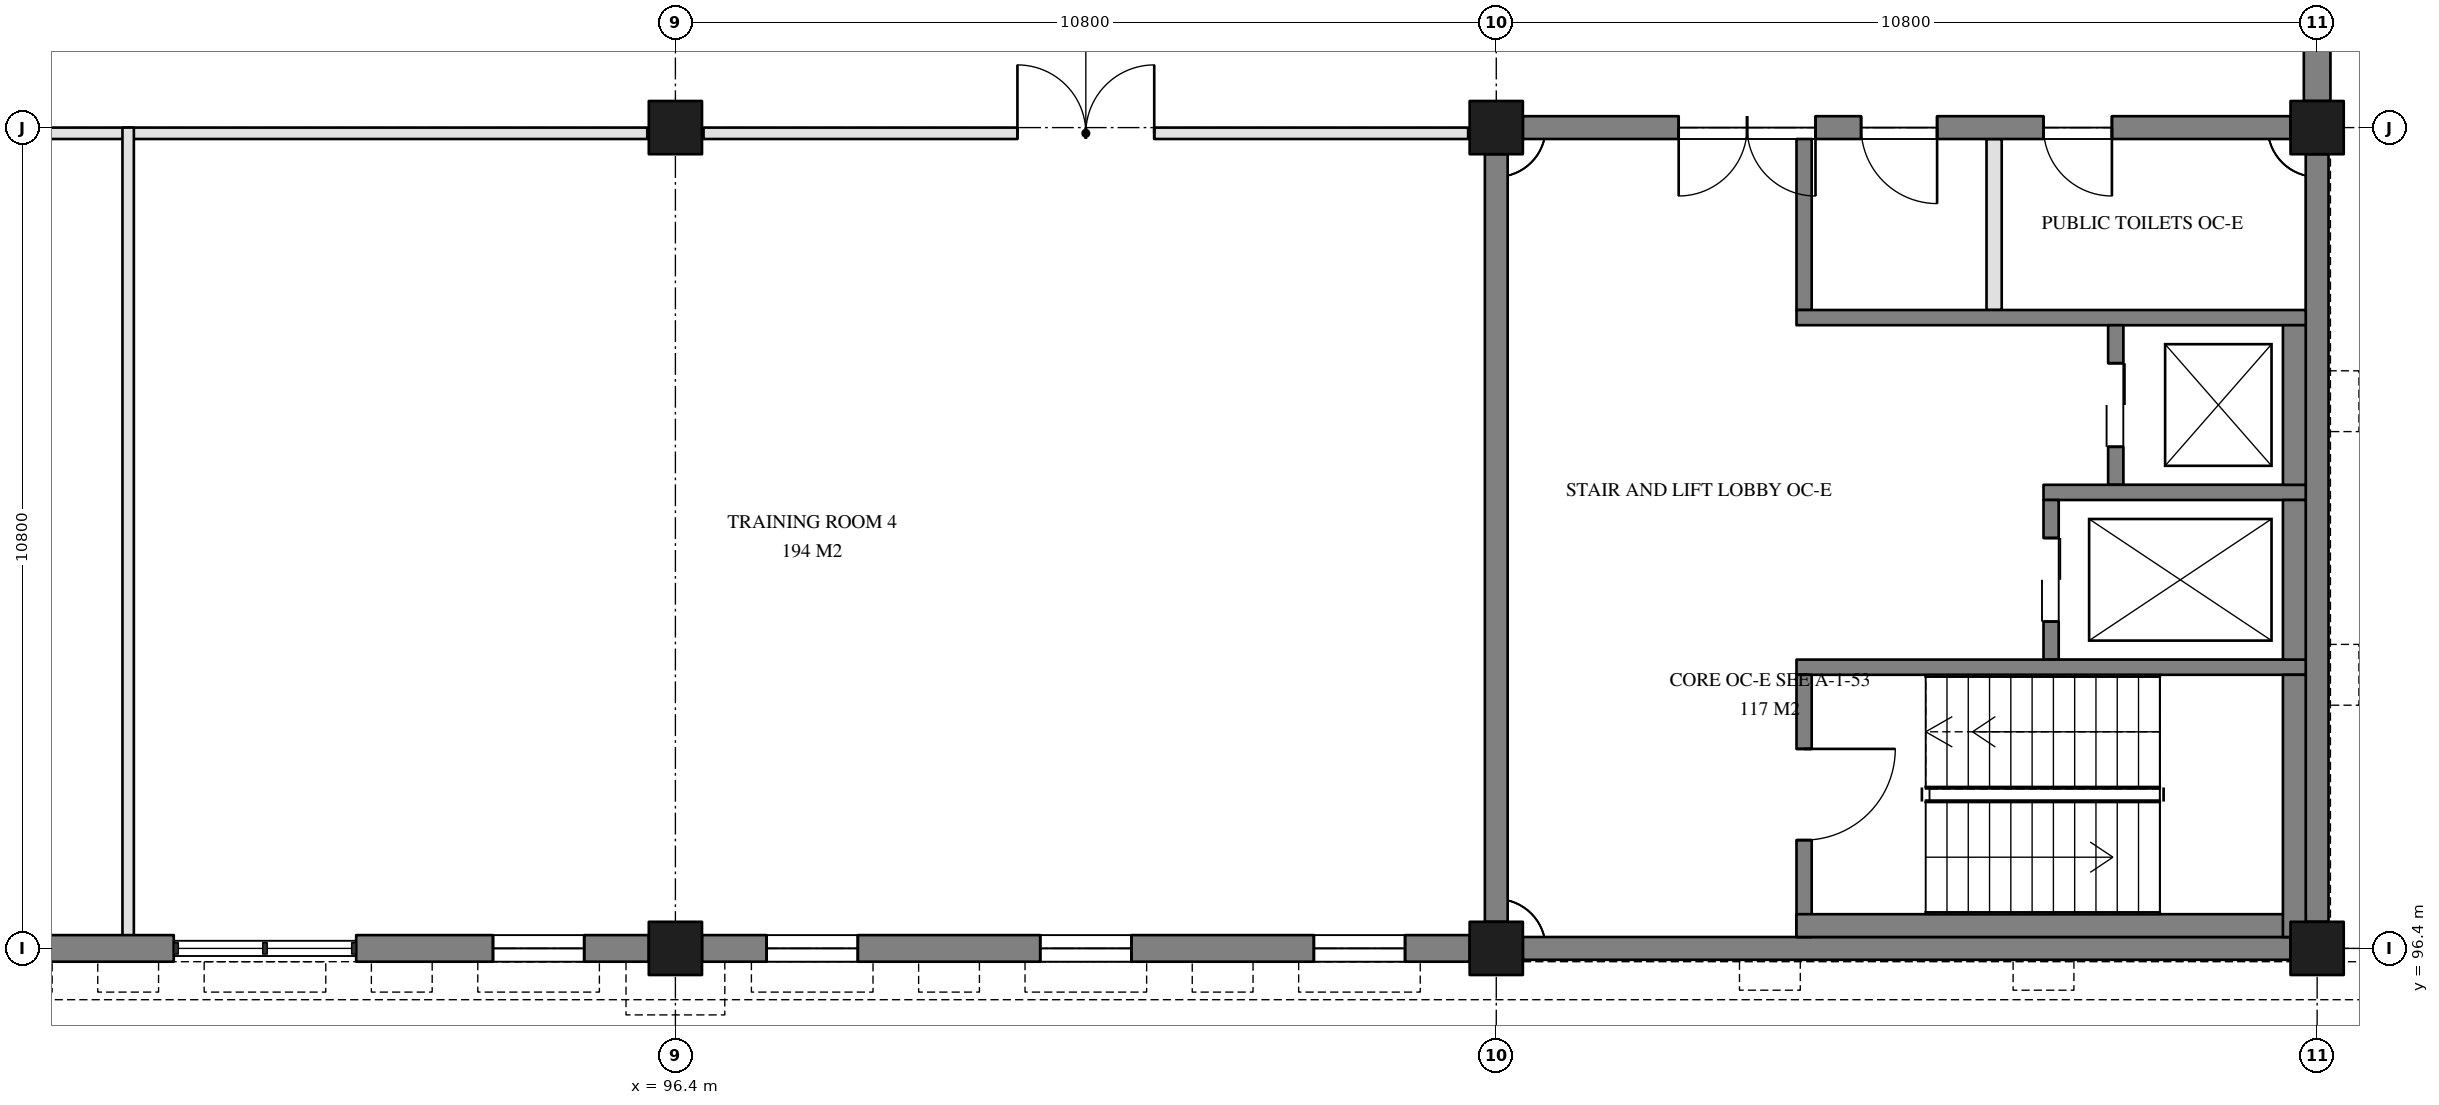
"""IFC4 building model, lengths in metres.
Left out: names, types, materials, properties, quantities, classifications, styles, units other than length and angle.
Written with IfcOpenShell. Run it as: python <this file> out.ifc"""

import sys

from ifc_helpers import new_model, si_unit, direction, frame, frame_2d, origin, origin_2d, place, context, subcontext, project, spatial, rectangle, extrude, element, fill, save


model = new_model("IFC4")
c1 = context("Model", 3, precision=1e-05, world=origin(), true_north=direction((0.0, 1.0)))
c2 = subcontext(c1, "Body", "Model", "MODEL_VIEW")
j1 = project(units=[si_unit("LENGTHUNIT", "METRE"), si_unit("PLANEANGLEUNIT", "RADIAN")], contexts=[c1])
p1 = place(None, origin())
s1 = spatial("IfcSite", under=j1, at=p1, CompositionType="ELEMENT")
p2 = place(p1, origin())
s2 = spatial("IfcBuilding", under=s1, at=p2, CompositionType="ELEMENT")
p3 = place(p2, frame((0.0, 0.0, 20.4)))
s3 = spatial("IfcBuildingStorey", under=s2, at=p3, CompositionType="ELEMENT", Elevation=20.4)
for number, where, z_axis, x_axis in (
    (1, (96.4, 96.4, 0.0), (0.0, 0.0, 1.0), (1.0, 0.0, 0.0)),
    (2, (96.4, 107.2, 0.0), (0.0, 0.0, 1.0), (1.0, 0.0, 0.0)),
    (3, (107.2, 96.4, 0.0), (0.0, 0.0, 1.0), (1.0, 0.0, 0.0)),
    (4, (107.2, 107.2, 0.0), (0.0, 0.0, 1.0), (1.0, 0.0, 0.0)),
    (5, (118.0, 96.4, 0.0), (0.0, 0.0, 1.0), (1.0, 0.0, 0.0)),
    (6, (118.0, 107.2, 0.0), (0.0, 0.0, 1.0), (1.0, 0.0, 0.0)),
):
    element("IfcColumn", number, at=place(p3, frame(where, z_axis=z_axis, x_axis=x_axis)), inside=s3, PredefinedType="COLUMN", context=c2, shape_type="SweptSolid", body=[
        extrude(rectangle(XDim=0.7, YDim=0.7, at=origin_2d()), origin(), (0.0, 0.0, 1.0), 3.9),
    ])
p4 = place(p3, frame((107.55, 96.4, 0.0), z_axis=(0.0, 0.0, 1.0), x_axis=(1.0, 0.0, 0.0)))
e7 = element("IfcWall", 7, at=p4, inside=s3, PredefinedType="SOLIDWALL", context=c2, shape_type="SweptSolid", body=[
    extrude(rectangle(XDim=10.1, YDim=0.3, at=frame_2d((5.05, 0.0))), origin(), (0.0, 0.0, 1.0), 3.9),
])
p5 = place(p3, frame((118.0, 96.75, 0.0), z_axis=(0.0, 0.0, 1.0), x_axis=(0.0, 1.0, 0.0)))
e8 = element("IfcWall", 8, at=p5, inside=s3, PredefinedType="SOLIDWALL", context=c2, shape_type="SweptSolid", body=[
    extrude(rectangle(XDim=10.1, YDim=0.3, at=frame_2d((5.05, 0.0))), origin(), (0.0, 0.0, 1.0), 3.9),
])
p6 = place(p3, frame((117.65, 107.2, 0.0), z_axis=(0.0, 0.0, 1.0), x_axis=(-1.0, 0.0, 0.0)))
e9 = element("IfcWall", 9, at=p6, inside=s3, PredefinedType="SOLIDWALL", context=c2, shape_type="SweptSolid", body=[
    extrude(rectangle(XDim=10.1, YDim=0.3, at=frame_2d((5.05, 0.0))), origin(), (0.0, 0.0, 1.0), 3.9),
])
p7 = place(p6, frame((6.25, 0.0, 0.0)))
e10 = element("IfcOpeningElement", 10, at=p7, cuts=e9, PredefinedType="OPENING", context=c2, shape_type="SweptSolid", body=[
    extrude(rectangle(XDim=1.8, YDim=2.1, at=frame_2d((0.9, 1.05))), frame((0.0, 0.16, 0.0), z_axis=(0.0, -1.0, 0.0), x_axis=(1.0, 0.0, 0.0)), (0.0, 0.0, 1.0), 0.32),
])
p8 = place(p6, frame((4.65, 0.0, 0.0)))
e11 = element("IfcOpeningElement", 11, at=p8, cuts=e9, PredefinedType="OPENING", context=c2, shape_type="SweptSolid", body=[
    extrude(rectangle(XDim=1.0, YDim=2.1, at=frame_2d((0.5, 1.05))), frame((0.0, 0.16, 0.0), z_axis=(0.0, -1.0, 0.0), x_axis=(1.0, 0.0, 0.0)), (0.0, 0.0, 1.0), 0.32),
])
p9 = place(p6, frame((2.35, 0.0, 0.0)))
e12 = element("IfcOpeningElement", 12, at=p9, cuts=e9, PredefinedType="OPENING", context=c2, shape_type="SweptSolid", body=[
    extrude(rectangle(XDim=0.9, YDim=2.1, at=frame_2d((0.45, 1.05))), frame((0.0, 0.16, 0.0), z_axis=(0.0, -1.0, 0.0), x_axis=(1.0, 0.0, 0.0)), (0.0, 0.0, 1.0), 0.32),
])
p10 = place(p3, frame((107.2, 106.85, 0.0), z_axis=(0.0, 0.0, 1.0), x_axis=(0.0, -1.0, 0.0)))
e13 = element("IfcWall", 13, at=p10, inside=s3, PredefinedType="SOLIDWALL", context=c2, shape_type="SweptSolid", body=[
    extrude(rectangle(XDim=10.1, YDim=0.3, at=frame_2d((5.05, 0.0))), origin(), (0.0, 0.0, 1.0), 3.9),
])
p11 = place(p3, frame((85.95, 96.4, 0.0), z_axis=(0.0, 0.0, 1.0), x_axis=(1.0, 0.0, 0.0)))
e14 = element("IfcWall", 14, at=p11, inside=s3, PredefinedType="SOLIDWALL", context=c2, shape_type="SweptSolid", body=[
    extrude(rectangle(XDim=3.85, YDim=0.35, at=frame_2d((1.925, 0.0))), origin(), (0.0, 0.0, 1.0), 2.8),
])
p12 = place(p11, frame((0.85, 0.0, 0.9)))
e15 = element("IfcOpeningElement", 15, at=p12, cuts=e14, PredefinedType="OPENING", context=c2, shape_type="SweptSolid", body=[
    extrude(rectangle(XDim=1.2, YDim=1.8, at=frame_2d((0.6, 0.9))), frame((0.0, 0.185, 0.0), z_axis=(0.0, -1.0, 0.0), x_axis=(1.0, 0.0, 0.0)), (0.0, 0.0, 1.0), 0.37),
])
p13 = place(p3, frame((92.2, 96.4, 0.0), z_axis=(0.0, 0.0, 1.0), x_axis=(1.0, 0.0, 0.0)))
e16 = element("IfcWall", 16, at=p13, inside=s3, PredefinedType="SOLIDWALL", context=c2, shape_type="SweptSolid", body=[
    extrude(rectangle(XDim=3.85, YDim=0.35, at=frame_2d((1.925, 0.0))), origin(), (0.0, 0.0, 1.0), 2.8),
])
p14 = place(p13, frame((1.8, 0.0, 0.9)))
e17 = element("IfcOpeningElement", 17, at=p14, cuts=e16, PredefinedType="OPENING", context=c2, shape_type="SweptSolid", body=[
    extrude(rectangle(XDim=1.2, YDim=1.8, at=frame_2d((0.6, 0.9))), frame((0.0, 0.185, 0.0), z_axis=(0.0, -1.0, 0.0), x_axis=(1.0, 0.0, 0.0)), (0.0, 0.0, 1.0), 0.37),
])
p15 = place(p3, frame((96.75, 96.4, 0.0), z_axis=(0.0, 0.0, 1.0), x_axis=(1.0, 0.0, 0.0)))
e18 = element("IfcWall", 18, at=p15, inside=s3, PredefinedType="SOLIDWALL", context=c2, shape_type="SweptSolid", body=[
    extrude(rectangle(XDim=10.1, YDim=0.35, at=frame_2d((5.05, 0.0))), origin(), (0.0, 0.0, 1.0), 2.8),
])
p16 = place(p15, frame((0.85, 0.0, 0.9)))
e19 = element("IfcOpeningElement", 19, at=p16, cuts=e18, PredefinedType="OPENING", context=c2, shape_type="SweptSolid", body=[
    extrude(rectangle(XDim=1.2, YDim=1.8, at=frame_2d((0.6, 0.9))), frame((0.0, 0.185, 0.0), z_axis=(0.0, -1.0, 0.0), x_axis=(1.0, 0.0, 0.0)), (0.0, 0.0, 1.0), 0.37),
])
p17 = place(p15, frame((4.45, 0.0, 0.9)))
e20 = element("IfcOpeningElement", 20, at=p17, cuts=e18, PredefinedType="OPENING", context=c2, shape_type="SweptSolid", body=[
    extrude(rectangle(XDim=1.2, YDim=1.8, at=frame_2d((0.6, 0.9))), frame((0.0, 0.185, 0.0), z_axis=(0.0, -1.0, 0.0), x_axis=(1.0, 0.0, 0.0)), (0.0, 0.0, 1.0), 0.37),
])
p18 = place(p15, frame((8.05, 0.0, 0.9)))
e21 = element("IfcOpeningElement", 21, at=p18, cuts=e18, PredefinedType="OPENING", context=c2, shape_type="SweptSolid", body=[
    extrude(rectangle(XDim=1.2, YDim=1.8, at=frame_2d((0.6, 0.9))), frame((0.0, 0.185, 0.0), z_axis=(0.0, -1.0, 0.0), x_axis=(1.0, 0.0, 0.0)), (0.0, 0.0, 1.0), 0.37),
])
p19 = place(p3, frame((118.0, 107.55, 0.0), z_axis=(0.0, 0.0, 1.0), x_axis=(0.0, 1.0, 0.0)))
e22 = element("IfcWall", 22, at=p19, inside=s3, PredefinedType="SOLIDWALL", context=c2, shape_type="SweptSolid", body=[
    extrude(rectangle(XDim=3.85, YDim=0.35, at=frame_2d((1.925, 0.0))), origin(), (0.0, 0.0, 1.0), 2.8),
])
p20 = place(p19, frame((1.0, 0.0, 0.9)))
e23 = element("IfcOpeningElement", 23, at=p20, cuts=e22, PredefinedType="OPENING", context=c2, shape_type="SweptSolid", body=[
    extrude(rectangle(XDim=0.9, YDim=1.8, at=frame_2d((0.45, 0.9))), frame((0.0, 0.185, 0.0), z_axis=(0.0, -1.0, 0.0), x_axis=(1.0, 0.0, 0.0)), (0.0, 0.0, 1.0), 0.37),
])
p21 = place(p3, frame((111.25, 107.05, 0.0), z_axis=(0.0, 0.0, 1.0), x_axis=(0.0, -1.0, 0.0)))
e24 = element("IfcWall", 24, at=p21, inside=s3, PredefinedType="SOLIDWALL", context=c2, shape_type="SweptSolid", body=[
    extrude(rectangle(XDim=2.25, YDim=0.2, at=frame_2d((1.125, 0.0))), origin(), (0.0, 0.0, 1.0), 3.6),
])
p22 = place(p3, frame((111.15, 104.7, 0.0), z_axis=(0.0, 0.0, 1.0), x_axis=(1.0, 0.0, 0.0)))
e25 = element("IfcWall", 25, at=p22, inside=s3, PredefinedType="SOLIDWALL", context=c2, shape_type="SweptSolid", body=[
    extrude(rectangle(XDim=6.7, YDim=0.2, at=frame_2d((3.35, 0.0))), origin(), (0.0, 0.0, 1.0), 3.6),
])
p23 = place(p3, frame((115.35, 104.6, 0.0), z_axis=(0.0, 0.0, 1.0), x_axis=(0.0, -1.0, 0.0)))
e26 = element("IfcWall", 26, at=p23, inside=s3, PredefinedType="SOLIDWALL", context=c2, shape_type="SweptSolid", body=[
    extrude(rectangle(XDim=2.1, YDim=0.2, at=frame_2d((1.05, 0.0))), origin(), (0.0, 0.0, 1.0), 3.6),
])
p24 = place(p23, frame((0.5, 0.0, 0.0)))
e27 = element("IfcOpeningElement", 27, at=p24, cuts=e26, PredefinedType="OPENING", context=c2, shape_type="SweptSolid", body=[
    extrude(rectangle(XDim=1.1, YDim=2.1, at=frame_2d((0.55, 1.05))), frame((0.0, 0.11, 0.0), z_axis=(0.0, -1.0, 0.0), x_axis=(1.0, 0.0, 0.0)), (0.0, 0.0, 1.0), 0.22),
])
p25 = place(p3, frame((114.4, 102.4, 0.0), z_axis=(0.0, 0.0, 1.0), x_axis=(1.0, 0.0, 0.0)))
e28 = element("IfcWall", 28, at=p25, inside=s3, PredefinedType="SOLIDWALL", context=c2, shape_type="SweptSolid", body=[
    extrude(rectangle(XDim=3.45, YDim=0.2, at=frame_2d((1.725, 0.0))), origin(), (0.0, 0.0, 1.0), 3.6),
])
p26 = place(p3, frame((114.5, 102.3, 0.0), z_axis=(0.0, 0.0, 1.0), x_axis=(0.0, -1.0, 0.0)))
e29 = element("IfcWall", 29, at=p26, inside=s3, PredefinedType="SOLIDWALL", context=c2, shape_type="SweptSolid", body=[
    extrude(rectangle(XDim=2.1, YDim=0.2, at=frame_2d((1.05, 0.0))), origin(), (0.0, 0.0, 1.0), 3.6),
])
p27 = place(p26, frame((0.5, 0.0, 0.0)))
e30 = element("IfcOpeningElement", 30, at=p27, cuts=e29, PredefinedType="OPENING", context=c2, shape_type="SweptSolid", body=[
    extrude(rectangle(XDim=1.1, YDim=2.1, at=frame_2d((0.55, 1.05))), frame((0.0, 0.11, 0.0), z_axis=(0.0, -1.0, 0.0), x_axis=(1.0, 0.0, 0.0)), (0.0, 0.0, 1.0), 0.22),
])
p28 = place(p3, frame((111.15, 100.1, 0.0), z_axis=(0.0, 0.0, 1.0), x_axis=(1.0, 0.0, 0.0)))
e31 = element("IfcWall", 31, at=p28, inside=s3, PredefinedType="SOLIDWALL", context=c2, shape_type="SweptSolid", body=[
    extrude(rectangle(XDim=6.7, YDim=0.2, at=frame_2d((3.35, 0.0))), origin(), (0.0, 0.0, 1.0), 3.6),
])
p29 = place(p3, frame((111.25, 100.0, 0.0), z_axis=(0.0, 0.0, 1.0), x_axis=(0.0, -1.0, 0.0)))
e32 = element("IfcWall", 32, at=p29, inside=s3, PredefinedType="SOLIDWALL", context=c2, shape_type="SweptSolid", body=[
    extrude(rectangle(XDim=3.45, YDim=0.2, at=frame_2d((1.725, 0.0))), origin(), (0.0, 0.0, 1.0), 3.6),
])
p30 = place(p29, frame((0.975, 0.0, 0.0)))
e33 = element("IfcOpeningElement", 33, at=p30, cuts=e32, PredefinedType="OPENING", context=c2, shape_type="SweptSolid", body=[
    extrude(rectangle(XDim=1.2, YDim=2.1, at=frame_2d((0.6, 1.05))), frame((0.0, 0.11, 0.0), z_axis=(0.0, -1.0, 0.0), x_axis=(1.0, 0.0, 0.0)), (0.0, 0.0, 1.0), 0.22),
])
p31 = place(p3, frame((111.15, 96.7, -0.3), z_axis=(0.0, 0.0, 1.0), x_axis=(1.0, 0.0, 0.0)))
e34 = element("IfcWall", 34, at=p31, inside=s3, PredefinedType="SOLIDWALL", context=c2, shape_type="SweptSolid", body=[
    extrude(rectangle(XDim=6.7, YDim=0.3, at=frame_2d((3.35, 0.0))), origin(), (0.0, 0.0, 1.0), 3.9),
])
p32 = place(p3, frame((117.7, 100.0, -0.3), z_axis=(0.0, 0.0, 1.0), x_axis=(0.0, -1.0, 0.0)))
e35 = element("IfcWall", 35, at=p32, inside=s3, PredefinedType="SOLIDWALL", context=c2, shape_type="SweptSolid", body=[
    extrude(rectangle(XDim=3.45, YDim=0.3, at=frame_2d((1.725, 0.0))), origin(), (0.0, 0.0, 1.0), 3.9),
])
for number, where, z_axis, x_axis in (
    (36, (117.7, 104.6, -0.3), (0.0, 0.0, 1.0), (0.0, -1.0, 0.0)),
    (37, (117.7, 102.3, -0.3), (0.0, 0.0, 1.0), (0.0, -1.0, 0.0)),
):
    element("IfcWall", number, at=place(p3, frame(where, z_axis=z_axis, x_axis=x_axis)), inside=s3, PredefinedType="SOLIDWALL", context=c2, shape_type="SweptSolid", body=[
        extrude(rectangle(XDim=2.1, YDim=0.3, at=frame_2d((1.05, 0.0))), origin(), (0.0, 0.0, 1.0), 3.9),
    ])
p33 = place(p3, frame((113.75, 107.05, 0.0), z_axis=(0.0, 0.0, 1.0), x_axis=(0.0, -1.0, 0.0)))
e38 = element("IfcWall", 38, at=p33, inside=s3, PredefinedType="PARTITIONING", context=c2, shape_type="SweptSolid", body=[
    extrude(rectangle(XDim=2.25, YDim=0.2, at=frame_2d((1.125, 0.0))), origin(), (0.0, 0.0, 1.0), 3.6),
])
p34 = place(p3, frame((85.97, 107.125, 0.0), z_axis=(0.0, 0.0, 1.0), x_axis=(1.0, 0.0, 0.0)))
e39 = element("IfcWall", 39, at=p34, inside=s3, PredefinedType="PARTITIONING", context=c2, shape_type="SweptSolid", body=[
    extrude(rectangle(XDim=3.23, YDim=0.15, at=frame_2d((1.615, 0.0))), origin(), (0.0, 0.0, 1.0), 2.8),
])
p35 = place(p3, frame((96.77, 107.125, 0.0), z_axis=(0.0, 0.0, 1.0), x_axis=(1.0, 0.0, 0.0)))
e40 = element("IfcWall", 40, at=p35, inside=s3, PredefinedType="PARTITIONING", context=c2, shape_type="SweptSolid", body=[
    extrude(rectangle(XDim=10.06, YDim=0.15, at=frame_2d((5.03, 0.0))), origin(), (0.0, 0.0, 1.0), 2.8),
])
p36 = place(p35, frame((4.13, 0.0, 0.0)))
e41 = element("IfcOpeningElement", 41, at=p36, cuts=e40, PredefinedType="OPENING", context=c2, shape_type="SweptSolid", body=[
    extrude(rectangle(XDim=1.8, YDim=2.1, at=frame_2d((0.9, 1.05))), frame((0.0, 0.085, 0.0), z_axis=(0.0, -1.0, 0.0), x_axis=(1.0, 0.0, 0.0)), (0.0, 0.0, 1.0), 0.17),
])
p37 = place(p3, frame((89.2, 107.125, 0.0), z_axis=(0.0, 0.0, 1.0), x_axis=(1.0, 0.0, 0.0)))
e42 = element("IfcWall", 42, at=p37, inside=s3, PredefinedType="PARTITIONING", context=c2, shape_type="SweptSolid", body=[
    extrude(rectangle(XDim=6.83, YDim=0.15, at=frame_2d((3.415, 0.0))), origin(), (0.0, 0.0, 1.0), 2.8),
])
p38 = place(p3, frame((89.2, 96.4, 0.0), z_axis=(0.0, 0.0, 1.0), x_axis=(0.0, 1.0, 0.0)))
e43 = element("IfcWall", 43, at=p38, inside=s3, PredefinedType="PARTITIONING", context=c2, shape_type="SweptSolid", body=[
    extrude(rectangle(XDim=10.8, YDim=0.15, at=frame_2d((5.4, 0.0))), origin(), (0.0, 0.0, 1.0), 2.8),
])
p39 = place(p14, origin())
e44 = element("IfcWindow", 44, at=p39, inside=s3, PartitioningType="SINGLE_PANEL", PredefinedType="WINDOW", context=c2, shape_type="SweptSolid", body=[
    extrude(rectangle(XDim=1.2, YDim=1.8, at=frame_2d((0.6, 0.9))), frame((0.0, 0.03, 0.0), z_axis=(0.0, -1.0, 0.0), x_axis=(1.0, 0.0, 0.0)), (0.0, 0.0, 1.0), 0.06),
])
fill(e17, e44)
p40 = place(p16, origin())
e45 = element("IfcWindow", 45, at=p40, inside=s3, PartitioningType="SINGLE_PANEL", PredefinedType="WINDOW", context=c2, shape_type="SweptSolid", body=[
    extrude(rectangle(XDim=1.2, YDim=1.8, at=frame_2d((0.6, 0.9))), frame((0.0, 0.03, 0.0), z_axis=(0.0, -1.0, 0.0), x_axis=(1.0, 0.0, 0.0)), (0.0, 0.0, 1.0), 0.06),
])
fill(e19, e45)
p41 = place(p17, origin())
e46 = element("IfcWindow", 46, at=p41, inside=s3, PartitioningType="SINGLE_PANEL", PredefinedType="WINDOW", context=c2, shape_type="SweptSolid", body=[
    extrude(rectangle(XDim=1.2, YDim=1.8, at=frame_2d((0.6, 0.9))), frame((0.0, 0.03, 0.0), z_axis=(0.0, -1.0, 0.0), x_axis=(1.0, 0.0, 0.0)), (0.0, 0.0, 1.0), 0.06),
])
fill(e20, e46)
p42 = place(p18, origin())
e47 = element("IfcWindow", 47, at=p42, inside=s3, PartitioningType="SINGLE_PANEL", PredefinedType="WINDOW", context=c2, shape_type="SweptSolid", body=[
    extrude(rectangle(XDim=1.2, YDim=1.8, at=frame_2d((0.6, 0.9))), frame((0.0, 0.03, 0.0), z_axis=(0.0, -1.0, 0.0), x_axis=(1.0, 0.0, 0.0)), (0.0, 0.0, 1.0), 0.06),
])
fill(e21, e47)
p43 = place(p24, frame((1.1, 0.0, 0.0), z_axis=(0.0, 0.0, 1.0), x_axis=(-1.0, 0.0, 0.0)))
e48 = element("IfcDoor", 48, at=p43, inside=s3, OperationType="DOUBLE_DOOR_SLIDING", PredefinedType="DOOR", context=c2, shape_type="SweptSolid", body=[
    extrude(rectangle(XDim=1.1, YDim=2.1, at=frame_2d((0.55, 1.05))), frame((0.0, 0.025, 0.0), z_axis=(0.0, -1.0, 0.0), x_axis=(1.0, 0.0, 0.0)), (0.0, 0.0, 1.0), 0.05),
])
fill(e27, e48)
p44 = place(p27, frame((1.1, 0.0, 0.0), z_axis=(0.0, 0.0, 1.0), x_axis=(-1.0, 0.0, 0.0)))
e49 = element("IfcDoor", 49, at=p44, inside=s3, OperationType="DOUBLE_DOOR_SLIDING", PredefinedType="DOOR", context=c2, shape_type="SweptSolid", body=[
    extrude(rectangle(XDim=1.1, YDim=2.1, at=frame_2d((0.55, 1.05))), frame((0.0, 0.025, 0.0), z_axis=(0.0, -1.0, 0.0), x_axis=(1.0, 0.0, 0.0)), (0.0, 0.0, 1.0), 0.05),
])
fill(e30, e49)
p45 = place(p30, frame((1.2, 0.0, 0.0), z_axis=(0.0, 0.0, 1.0), x_axis=(-1.0, 0.0, 0.0)))
e50 = element("IfcDoor", 50, at=p45, inside=s3, OperationType="SINGLE_SWING_RIGHT", PredefinedType="DOOR", context=c2, shape_type="SweptSolid", body=[
    extrude(rectangle(XDim=1.2, YDim=2.1, at=frame_2d((0.6, 1.05))), frame((0.0, 0.025, 0.0), z_axis=(0.0, -1.0, 0.0), x_axis=(1.0, 0.0, 0.0)), (0.0, 0.0, 1.0), 0.05),
])
fill(e33, e50)
p46 = place(p7, frame((1.8, 0.0, 0.0), z_axis=(0.0, 0.0, 1.0), x_axis=(-1.0, 0.0, 0.0)))
e51 = element("IfcDoor", 51, at=p46, inside=s3, OperationType="DOUBLE_DOOR_DOUBLE_SWING", PredefinedType="DOOR", context=c2, shape_type="SweptSolid", body=[
    extrude(rectangle(XDim=1.8, YDim=2.1, at=frame_2d((0.9, 1.05))), frame((0.0, 0.025, 0.0), z_axis=(0.0, -1.0, 0.0), x_axis=(1.0, 0.0, 0.0)), (0.0, 0.0, 1.0), 0.05),
])
fill(e10, e51)
p47 = place(p8, origin())
e52 = element("IfcDoor", 52, at=p47, inside=s3, OperationType="SINGLE_SWING_RIGHT", PredefinedType="DOOR", context=c2, shape_type="SweptSolid", body=[
    extrude(rectangle(XDim=1.0, YDim=2.1, at=frame_2d((0.5, 1.05))), frame((0.0, 0.025, 0.0), z_axis=(0.0, -1.0, 0.0), x_axis=(1.0, 0.0, 0.0)), (0.0, 0.0, 1.0), 0.05),
])
fill(e11, e52)
p48 = place(p9, origin())
e53 = element("IfcDoor", 53, at=p48, inside=s3, OperationType="SINGLE_SWING_LEFT", PredefinedType="DOOR", context=c2, shape_type="SweptSolid", body=[
    extrude(rectangle(XDim=0.9, YDim=2.1, at=frame_2d((0.45, 1.05))), frame((0.0, 0.025, 0.0), z_axis=(0.0, -1.0, 0.0), x_axis=(1.0, 0.0, 0.0)), (0.0, 0.0, 1.0), 0.05),
])
fill(e12, e53)
p49 = place(p36, origin())
e54 = element("IfcDoor", 54, at=p49, inside=s3, OperationType="DOUBLE_DOOR_DOUBLE_SWING", PredefinedType="DOOR", context=c2, shape_type="SweptSolid", body=[
    extrude(rectangle(XDim=1.8, YDim=2.1, at=frame_2d((0.9, 1.05))), frame((0.0, 0.025, 0.0), z_axis=(0.0, -1.0, 0.0), x_axis=(1.0, 0.0, 0.0)), (0.0, 0.0, 1.0), 0.05),
])
fill(e41, e54)
save(model, sys.argv[1])
